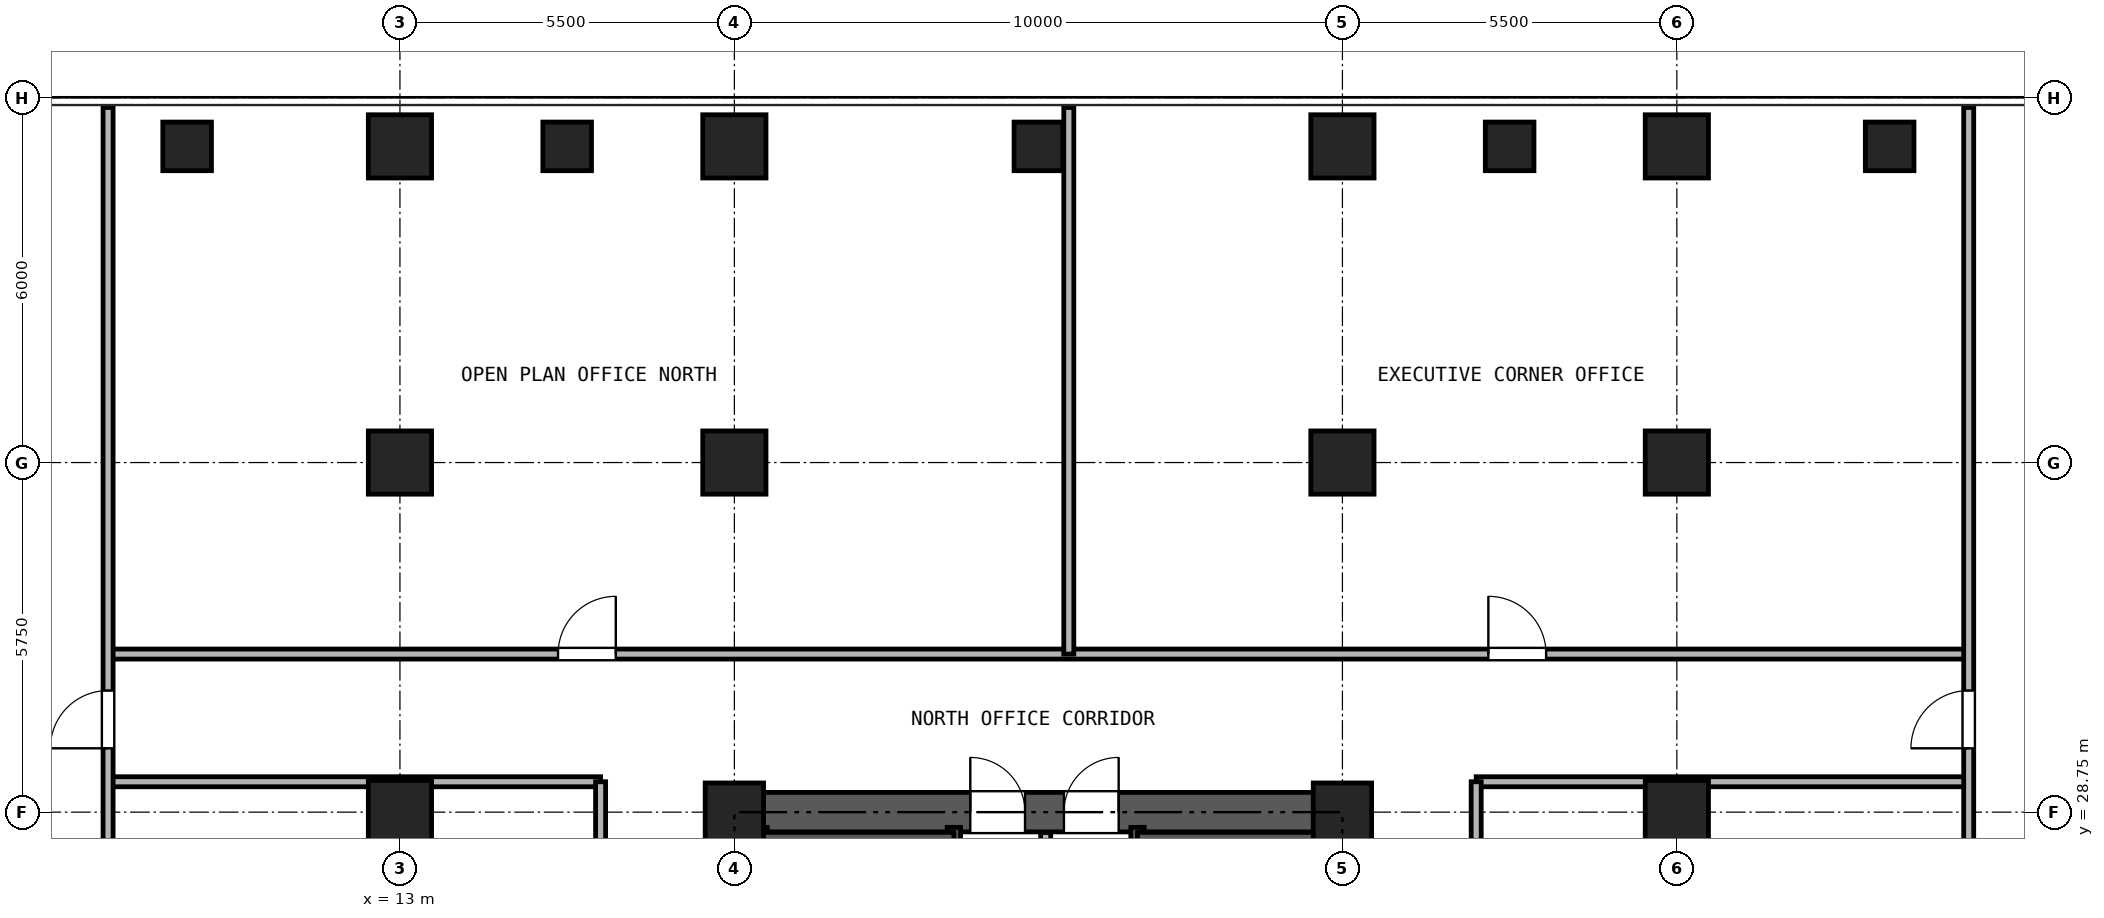
"""IFC4 building model, lengths in metres.
Left out: names, types, materials, properties, quantities, classifications, styles, units other than length and angle.
Written with IfcOpenShell. Run it as: python <this file> out.ifc"""

import sys

from ifc_helpers import new_model, si_unit, direction, frame, frame_2d, origin, origin_2d, place, context, subcontext, project, spatial, rectangle, hollow_rectangle, extrude, source, transform, mapped, element, fill, save


model = new_model("IFC4")
c1 = context("Model", 3, precision=1e-05, world=origin(), true_north=direction((0.0, 1.0)))
c2 = subcontext(c1, "Body", "Model", "MODEL_VIEW")
j1 = project(units=[si_unit("LENGTHUNIT", "METRE"), si_unit("PLANEANGLEUNIT", "RADIAN")], contexts=[c1])
p1 = place(None, origin())
s1 = spatial("IfcSite", under=j1, at=p1, CompositionType="ELEMENT")
p2 = place(p1, origin())
s2 = spatial("IfcBuilding", under=s1, at=p2, CompositionType="ELEMENT")
p3 = place(p2, frame((0.0, 0.0, 22.5)))
s3 = spatial("IfcBuildingStorey", under=s2, at=p3, CompositionType="ELEMENT", Elevation=22.5)
m1 = source(origin(), c2, "Body", "SweptSolid", [
    extrude(hollow_rectangle(XDim=1.04, YDim=1.04, WallThickness=0.065, at=origin_2d()), origin(), (0.0, 0.0, 1.0), 3.32),
])
for number, where, z_axis, x_axis in (
    (1, (13.0, 39.7, 0.0), (0.0, 0.0, 1.0), (1.0, 0.0, 0.0)),
    (2, (18.5, 39.7, 0.0), (0.0, 0.0, 1.0), (1.0, 0.0, 0.0)),
    (3, (28.5, 39.7, 0.0), (0.0, 0.0, 1.0), (1.0, 0.0, 0.0)),
    (4, (34.0, 39.7, 0.0), (0.0, 0.0, 1.0), (1.0, 0.0, 0.0)),
    (5, (13.0, 28.75, 0.0), (0.0, 0.0, 1.0), (1.0, 0.0, 0.0)),
    (6, (13.0, 34.5, 0.0), (0.0, 0.0, 1.0), (1.0, 0.0, 0.0)),
):
    element("IfcColumn", number, at=place(p3, frame(where, z_axis=z_axis, x_axis=x_axis)), inside=s3, PredefinedType="COLUMN", context=c2, shape_type="MappedRepresentation", body=[
        mapped(m1, transform((0.0, 0.0, 0.0), x_axis=(1.0, 0.0, 0.0), y_axis=(0.0, 1.0, 0.0), z_axis=(0.0, 0.0, 1.0), scale=1.0)),
    ])
m2 = source(origin(), c2, "Body", "SweptSolid", [
    extrude(hollow_rectangle(XDim=0.96, YDim=0.96, WallThickness=0.06, at=origin_2d()), origin(), (0.0, 0.0, 1.0), 3.32),
])
p4 = place(p3, frame((18.5, 28.75, 0.0), z_axis=(0.0, 0.0, 1.0), x_axis=(1.0, 0.0, 0.0)))
e7 = element("IfcColumn", 7, at=p4, inside=s3, PredefinedType="COLUMN", context=c2, shape_type="MappedRepresentation", body=[
    mapped(m2, transform((0.0, 0.0, 0.0), x_axis=(1.0, 0.0, 0.0), y_axis=(0.0, 1.0, 0.0), z_axis=(0.0, 0.0, 1.0), scale=1.0)),
])
p5 = place(p3, frame((18.5, 34.5, 0.0), z_axis=(0.0, 0.0, 1.0), x_axis=(1.0, 0.0, 0.0)))
e8 = element("IfcColumn", 8, at=p5, inside=s3, PredefinedType="COLUMN", context=c2, shape_type="MappedRepresentation", body=[
    mapped(m1, transform((0.0, 0.0, 0.0), x_axis=(1.0, 0.0, 0.0), y_axis=(0.0, 1.0, 0.0), z_axis=(0.0, 0.0, 1.0), scale=1.0)),
])
p6 = place(p3, frame((28.5, 28.75, 0.0), z_axis=(0.0, 0.0, 1.0), x_axis=(1.0, 0.0, 0.0)))
e9 = element("IfcColumn", 9, at=p6, inside=s3, PredefinedType="COLUMN", context=c2, shape_type="MappedRepresentation", body=[
    mapped(m2, transform((0.0, 0.0, 0.0), x_axis=(1.0, 0.0, 0.0), y_axis=(0.0, 1.0, 0.0), z_axis=(0.0, 0.0, 1.0), scale=1.0)),
])
for number, where, z_axis, x_axis in (
    (10, (28.5, 34.5, 0.0), (0.0, 0.0, 1.0), (1.0, 0.0, 0.0)),
    (11, (34.0, 28.75, 0.0), (0.0, 0.0, 1.0), (1.0, 0.0, 0.0)),
    (12, (34.0, 34.5, 0.0), (0.0, 0.0, 1.0), (1.0, 0.0, 0.0)),
):
    element("IfcColumn", number, at=place(p3, frame(where, z_axis=z_axis, x_axis=x_axis)), inside=s3, PredefinedType="COLUMN", context=c2, shape_type="MappedRepresentation", body=[
        mapped(m1, transform((0.0, 0.0, 0.0), x_axis=(1.0, 0.0, 0.0), y_axis=(0.0, 1.0, 0.0), z_axis=(0.0, 0.0, 1.0), scale=1.0)),
    ])
m3 = source(origin(), c2, "Body", "SweptSolid", [
    extrude(hollow_rectangle(XDim=0.8, YDim=0.8, WallThickness=0.045, at=origin_2d()), origin(), (0.0, 0.0, 1.0), 3.68),
])
for number, where, z_axis, x_axis in (
    (13, (9.5, 39.7, -0.36), (0.0, 0.0, 1.0), (1.0, 0.0, 0.0)),
    (14, (15.75, 39.7, -0.36), (0.0, 0.0, 1.0), (1.0, 0.0, 0.0)),
    (15, (23.5, 39.7, -0.36), (0.0, 0.0, 1.0), (1.0, 0.0, 0.0)),
    (16, (31.25, 39.7, -0.36), (0.0, 0.0, 1.0), (1.0, 0.0, 0.0)),
    (17, (37.5, 39.7, -0.36), (0.0, 0.0, 1.0), (1.0, 0.0, 0.0)),
):
    element("IfcColumn", number, at=place(p3, frame(where, z_axis=z_axis, x_axis=x_axis)), inside=s3, PredefinedType="COLUMN", context=c2, shape_type="MappedRepresentation", body=[
        mapped(m3, transform((0.0, 0.0, 0.0), x_axis=(1.0, 0.0, 0.0), y_axis=(0.0, 1.0, 0.0), z_axis=(0.0, 0.0, 1.0), scale=1.0)),
    ])
p7 = place(p3, frame((18.175, 28.75, 0.0), z_axis=(0.0, 0.0, 1.0), x_axis=(1.0, 0.0, 0.0)))
e18 = element("IfcWall", 18, at=p7, inside=s3, PredefinedType="SHEAR", context=c2, shape_type="SweptSolid", body=[
    extrude(rectangle(XDim=10.65, YDim=0.65, at=frame_2d((5.325, 0.0))), origin(), (0.0, 0.0, 1.0), 3.32),
])
p8 = place(p7, frame((4.205, 0.0, 0.0)))
e19 = element("IfcOpeningElement", 19, at=p8, cuts=e18, PredefinedType="OPENING", context=c2, shape_type="SweptSolid", body=[
    extrude(rectangle(XDim=0.9, YDim=2.05, at=frame_2d((0.45, 1.025))), frame((0.0, 0.335, 0.0), z_axis=(0.0, -1.0, 0.0), x_axis=(1.0, 0.0, 0.0)), (0.0, 0.0, 1.0), 0.67),
])
p9 = place(p7, frame((5.745, 0.0, 0.0)))
e20 = element("IfcOpeningElement", 20, at=p9, cuts=e18, PredefinedType="OPENING", context=c2, shape_type="SweptSolid", body=[
    extrude(rectangle(XDim=0.9, YDim=2.05, at=frame_2d((0.45, 1.025))), frame((0.0, 0.335, 0.0), z_axis=(0.0, -1.0, 0.0), x_axis=(1.0, 0.0, 0.0)), (0.0, 0.0, 1.0), 0.67),
])
p10 = place(p3, frame((18.5, 11.825, 0.0), z_axis=(0.0, 0.0, 1.0), x_axis=(0.0, 1.0, 0.0)))
e21 = element("IfcWall", 21, at=p10, inside=s3, PredefinedType="SHEAR", context=c2, shape_type="SweptSolid", body=[
    extrude(rectangle(XDim=16.6, YDim=0.65, at=frame_2d((8.3, 0.0))), origin(), (0.0, 0.0, 1.0), 3.32),
])
p11 = place(p10, frame((7.325, 0.0, 0.0)))
e22 = element("IfcOpeningElement", 22, at=p11, cuts=e21, PredefinedType="OPENING", context=c2, shape_type="SweptSolid", body=[
    extrude(rectangle(XDim=1.15, YDim=2.2, at=frame_2d((0.575, 1.1))), frame((0.0, 0.335, 0.0), z_axis=(0.0, -1.0, 0.0), x_axis=(1.0, 0.0, 0.0)), (0.0, 0.0, 1.0), 0.67),
])
p12 = place(p3, frame((28.5, 11.825, 0.0), z_axis=(0.0, 0.0, 1.0), x_axis=(0.0, 1.0, 0.0)))
e23 = element("IfcWall", 23, at=p12, inside=s3, PredefinedType="SHEAR", context=c2, shape_type="SweptSolid", body=[
    extrude(rectangle(XDim=16.6, YDim=0.65, at=frame_2d((8.3, 0.0))), origin(), (0.0, 0.0, 1.0), 3.32),
])
p13 = place(p12, frame((7.325, 0.0, 0.0)))
e24 = element("IfcOpeningElement", 24, at=p13, cuts=e23, PredefinedType="OPENING", context=c2, shape_type="SweptSolid", body=[
    extrude(rectangle(XDim=1.15, YDim=2.2, at=frame_2d((0.575, 1.1))), frame((0.0, 0.335, 0.0), z_axis=(0.0, -1.0, 0.0), x_axis=(1.0, 0.0, 0.0)), (0.0, 0.0, 1.0), 0.67),
])
for number, where, z_axis, x_axis in (
    (25, (18.93, 21.39, 0.0), (0.0, 0.0, 1.0), (0.0, 1.0, 0.0)),
    (26, (22.11, 21.39, 0.0), (0.0, 0.0, 1.0), (0.0, 1.0, 0.0)),
    (27, (25.13, 21.39, 0.0), (0.0, 0.0, 1.0), (0.0, 1.0, 0.0)),
):
    element("IfcWall", number, at=place(p3, frame(where, z_axis=z_axis, x_axis=x_axis)), inside=s3, PredefinedType="SOLIDWALL", context=c2, shape_type="SweptSolid", body=[
        extrude(rectangle(XDim=7.11, YDim=0.22, at=frame_2d((3.555, 0.0))), origin(), (0.0, 0.0, 1.0), 3.32),
    ])
p14 = place(p3, frame((18.835, 28.335, 0.0), z_axis=(0.0, 0.0, 1.0), x_axis=(1.0, 0.0, 0.0)))
e28 = element("IfcWall", 28, at=p14, inside=s3, PredefinedType="PARTITIONING", context=c2, shape_type="SweptSolid", body=[
    extrude(rectangle(XDim=3.275, YDim=0.165, at=frame_2d((1.638, 0.0))), origin(), (0.0, 0.0, 1.0), 3.32),
])
p15 = place(p3, frame((25.13, 28.335, 0.0), z_axis=(0.0, 0.0, 1.0), x_axis=(1.0, 0.0, 0.0)))
e29 = element("IfcWall", 29, at=p15, inside=s3, PredefinedType="PARTITIONING", context=c2, shape_type="SweptSolid", body=[
    extrude(rectangle(XDim=3.035, YDim=0.165, at=frame_2d((1.518, 0.0))), origin(), (0.0, 0.0, 1.0), 3.32),
])
p16 = place(p3, frame((23.62, 24.4, 0.0), z_axis=(0.0, 0.0, 1.0), x_axis=(0.0, 1.0, 0.0)))
e30 = element("IfcWall", 30, at=p16, inside=s3, PredefinedType="PARTITIONING", context=c2, shape_type="SweptSolid", body=[
    extrude(rectangle(XDim=4.015, YDim=0.165, at=frame_2d((2.008, 0.0))), origin(), (0.0, 0.0, 1.0), 3.32),
])
p17 = place(p3, frame((8.2, 31.35, 0.0), z_axis=(0.0, 0.0, 1.0), x_axis=(1.0, 0.0, 0.0)))
e31 = element("IfcWall", 31, at=p17, inside=s3, PredefinedType="PARTITIONING", context=c2, shape_type="SweptSolid", body=[
    extrude(rectangle(XDim=30.6, YDim=0.165, at=frame_2d((15.3, 0.0))), origin(), (0.0, 0.0, 1.0), 3.32),
])
p18 = place(p17, frame((7.4, 0.0, 0.0)))
e32 = element("IfcOpeningElement", 32, at=p18, cuts=e31, PredefinedType="OPENING", context=c2, shape_type="SweptSolid", body=[
    extrude(rectangle(XDim=0.95, YDim=2.15, at=frame_2d((0.475, 1.075))), frame((0.0, 0.093, 0.0), z_axis=(0.0, -1.0, 0.0), x_axis=(1.0, 0.0, 0.0)), (0.0, 0.0, 1.0), 0.185),
])
p19 = place(p17, frame((22.7, 0.0, 0.0)))
e33 = element("IfcOpeningElement", 33, at=p19, cuts=e31, PredefinedType="OPENING", context=c2, shape_type="SweptSolid", body=[
    extrude(rectangle(XDim=0.95, YDim=2.15, at=frame_2d((0.475, 1.075))), frame((0.0, 0.093, 0.0), z_axis=(0.0, -1.0, 0.0), x_axis=(1.0, 0.0, 0.0)), (0.0, 0.0, 1.0), 0.185),
])
for number, where, z_axis, x_axis in (
    (34, (8.2, 29.25, 0.0), (0.0, 0.0, 1.0), (1.0, 0.0, 0.0)),
    (35, (30.7, 29.25, 0.0), (0.0, 0.0, 1.0), (1.0, 0.0, 0.0)),
):
    element("IfcWall", number, at=place(p3, frame(where, z_axis=z_axis, x_axis=x_axis)), inside=s3, PredefinedType="PARTITIONING", context=c2, shape_type="SweptSolid", body=[
        extrude(rectangle(XDim=8.1, YDim=0.165, at=frame_2d((4.05, 0.0))), origin(), (0.0, 0.0, 1.0), 3.32),
    ])
p20 = place(p3, frame((16.3, 10.9, 0.0), z_axis=(0.0, 0.0, 1.0), x_axis=(0.0, 1.0, 0.0)))
e36 = element("IfcWall", 36, at=p20, inside=s3, PredefinedType="PARTITIONING", context=c2, shape_type="SweptSolid", body=[
    extrude(rectangle(XDim=18.35, YDim=0.165, at=frame_2d((9.175, 0.0))), origin(), (0.0, 0.0, 1.0), 3.32),
])
p21 = place(p20, frame((5.44, 0.0, 0.0)))
e37 = element("IfcOpeningElement", 37, at=p21, cuts=e36, PredefinedType="OPENING", context=c2, shape_type="SweptSolid", body=[
    extrude(rectangle(XDim=0.95, YDim=2.15, at=frame_2d((0.475, 1.075))), frame((0.0, 0.093, 0.0), z_axis=(0.0, -1.0, 0.0), x_axis=(1.0, 0.0, 0.0)), (0.0, 0.0, 1.0), 0.185),
])
p22 = place(p20, frame((14.616, 0.0, 0.0)))
e38 = element("IfcOpeningElement", 38, at=p22, cuts=e36, PredefinedType="OPENING", context=c2, shape_type="SweptSolid", body=[
    extrude(rectangle(XDim=0.95, YDim=2.15, at=frame_2d((0.475, 1.075))), frame((0.0, 0.093, 0.0), z_axis=(0.0, -1.0, 0.0), x_axis=(1.0, 0.0, 0.0)), (0.0, 0.0, 1.0), 0.185),
])
p23 = place(p3, frame((30.7, 10.9, 0.0), z_axis=(0.0, 0.0, 1.0), x_axis=(0.0, 1.0, 0.0)))
e39 = element("IfcWall", 39, at=p23, inside=s3, PredefinedType="PARTITIONING", context=c2, shape_type="SweptSolid", body=[
    extrude(rectangle(XDim=18.35, YDim=0.165, at=frame_2d((9.175, 0.0))), origin(), (0.0, 0.0, 1.0), 3.32),
])
p24 = place(p23, frame((8.675, 0.0, 0.0)))
e40 = element("IfcOpeningElement", 40, at=p24, cuts=e39, PredefinedType="OPENING", context=c2, shape_type="SweptSolid", body=[
    extrude(rectangle(XDim=0.95, YDim=2.15, at=frame_2d((0.475, 1.075))), frame((0.0, 0.093, 0.0), z_axis=(0.0, -1.0, 0.0), x_axis=(1.0, 0.0, 0.0)), (0.0, 0.0, 1.0), 0.185),
])
p25 = place(p3, frame((8.2, 0.16, 0.0), z_axis=(0.0, 0.0, 1.0), x_axis=(0.0, 1.0, 0.0)))
e41 = element("IfcWall", 41, at=p25, inside=s3, PredefinedType="PARTITIONING", context=c2, shape_type="SweptSolid", body=[
    extrude(rectangle(XDim=40.18, YDim=0.165, at=frame_2d((20.09, 0.0))), origin(), (0.0, 0.0, 1.0), 3.32),
])
p26 = place(p25, frame((9.19, 0.0, 0.0)))
e42 = element("IfcOpeningElement", 42, at=p26, cuts=e41, PredefinedType="OPENING", context=c2, shape_type="SweptSolid", body=[
    extrude(rectangle(XDim=0.95, YDim=2.15, at=frame_2d((0.475, 1.075))), frame((0.0, 0.093, 0.0), z_axis=(0.0, -1.0, 0.0), x_axis=(1.0, 0.0, 0.0)), (0.0, 0.0, 1.0), 0.185),
])
p27 = place(p25, frame((29.64, 0.0, 0.0)))
e43 = element("IfcOpeningElement", 43, at=p27, cuts=e41, PredefinedType="OPENING", context=c2, shape_type="SweptSolid", body=[
    extrude(rectangle(XDim=0.95, YDim=2.15, at=frame_2d((0.475, 1.075))), frame((0.0, 0.093, 0.0), z_axis=(0.0, -1.0, 0.0), x_axis=(1.0, 0.0, 0.0)), (0.0, 0.0, 1.0), 0.185),
])
p28 = place(p3, frame((38.8, 0.16, 0.0), z_axis=(0.0, 0.0, 1.0), x_axis=(0.0, 1.0, 0.0)))
e44 = element("IfcWall", 44, at=p28, inside=s3, PredefinedType="PARTITIONING", context=c2, shape_type="SweptSolid", body=[
    extrude(rectangle(XDim=40.18, YDim=0.165, at=frame_2d((20.09, 0.0))), origin(), (0.0, 0.0, 1.0), 3.32),
])
p29 = place(p28, frame((9.19, 0.0, 0.0)))
e45 = element("IfcOpeningElement", 45, at=p29, cuts=e44, PredefinedType="OPENING", context=c2, shape_type="SweptSolid", body=[
    extrude(rectangle(XDim=0.95, YDim=2.15, at=frame_2d((0.475, 1.075))), frame((0.0, 0.093, 0.0), z_axis=(0.0, -1.0, 0.0), x_axis=(1.0, 0.0, 0.0)), (0.0, 0.0, 1.0), 0.185),
])
p30 = place(p28, frame((29.64, 0.0, 0.0)))
e46 = element("IfcOpeningElement", 46, at=p30, cuts=e44, PredefinedType="OPENING", context=c2, shape_type="SweptSolid", body=[
    extrude(rectangle(XDim=0.95, YDim=2.15, at=frame_2d((0.475, 1.075))), frame((0.0, 0.093, 0.0), z_axis=(0.0, -1.0, 0.0), x_axis=(1.0, 0.0, 0.0)), (0.0, 0.0, 1.0), 0.185),
])
p31 = place(p3, frame((24.0, 31.35, 0.0), z_axis=(0.0, 0.0, 1.0), x_axis=(0.0, 1.0, 0.0)))
e47 = element("IfcWall", 47, at=p31, inside=s3, PredefinedType="PARTITIONING", context=c2, shape_type="SweptSolid", body=[
    extrude(rectangle(XDim=8.99, YDim=0.165, at=frame_2d((4.495, 0.0))), origin(), (0.0, 0.0, 1.0), 3.32),
])
p32 = place(p8, origin())
e48 = element("IfcDoor", 48, at=p32, inside=s3, OperationType="SINGLE_SWING_LEFT", PredefinedType="DOOR", context=c2, shape_type="SweptSolid", body=[
    extrude(rectangle(XDim=0.9, YDim=2.05, at=frame_2d((0.45, 1.025))), frame((0.0, 0.025, 0.0), z_axis=(0.0, -1.0, 0.0), x_axis=(1.0, 0.0, 0.0)), (0.0, 0.0, 1.0), 0.05),
])
fill(e19, e48)
p33 = place(p9, origin())
e49 = element("IfcDoor", 49, at=p33, inside=s3, OperationType="SINGLE_SWING_RIGHT", PredefinedType="DOOR", context=c2, shape_type="SweptSolid", body=[
    extrude(rectangle(XDim=0.9, YDim=2.05, at=frame_2d((0.45, 1.025))), frame((0.0, 0.025, 0.0), z_axis=(0.0, -1.0, 0.0), x_axis=(1.0, 0.0, 0.0)), (0.0, 0.0, 1.0), 0.05),
])
fill(e20, e49)
p34 = place(p18, origin())
e50 = element("IfcDoor", 50, at=p34, inside=s3, OperationType="SINGLE_SWING_RIGHT", PredefinedType="DOOR", context=c2, shape_type="SweptSolid", body=[
    extrude(rectangle(XDim=0.95, YDim=2.15, at=frame_2d((0.475, 1.075))), frame((0.0, 0.025, 0.0), z_axis=(0.0, -1.0, 0.0), x_axis=(1.0, 0.0, 0.0)), (0.0, 0.0, 1.0), 0.05),
])
fill(e32, e50)
p35 = place(p19, origin())
e51 = element("IfcDoor", 51, at=p35, inside=s3, OperationType="SINGLE_SWING_LEFT", PredefinedType="DOOR", context=c2, shape_type="SweptSolid", body=[
    extrude(rectangle(XDim=0.95, YDim=2.15, at=frame_2d((0.475, 1.075))), frame((0.0, 0.025, 0.0), z_axis=(0.0, -1.0, 0.0), x_axis=(1.0, 0.0, 0.0)), (0.0, 0.0, 1.0), 0.05),
])
fill(e33, e51)
p36 = place(p27, frame((0.95, 0.0, 0.0), z_axis=(0.0, 0.0, 1.0), x_axis=(-1.0, 0.0, 0.0)))
e52 = element("IfcDoor", 52, at=p36, inside=s3, OperationType="SINGLE_SWING_LEFT", PredefinedType="DOOR", context=c2, shape_type="SweptSolid", body=[
    extrude(rectangle(XDim=0.95, YDim=2.15, at=frame_2d((0.475, 1.075))), frame((0.0, 0.025, 0.0), z_axis=(0.0, -1.0, 0.0), x_axis=(1.0, 0.0, 0.0)), (0.0, 0.0, 1.0), 0.05),
])
fill(e43, e52)
p37 = place(p30, origin())
e53 = element("IfcDoor", 53, at=p37, inside=s3, OperationType="SINGLE_SWING_LEFT", PredefinedType="DOOR", context=c2, shape_type="SweptSolid", body=[
    extrude(rectangle(XDim=0.95, YDim=2.15, at=frame_2d((0.475, 1.075))), frame((0.0, 0.025, 0.0), z_axis=(0.0, -1.0, 0.0), x_axis=(1.0, 0.0, 0.0)), (0.0, 0.0, 1.0), 0.05),
])
fill(e46, e53)
save(model, sys.argv[1])
